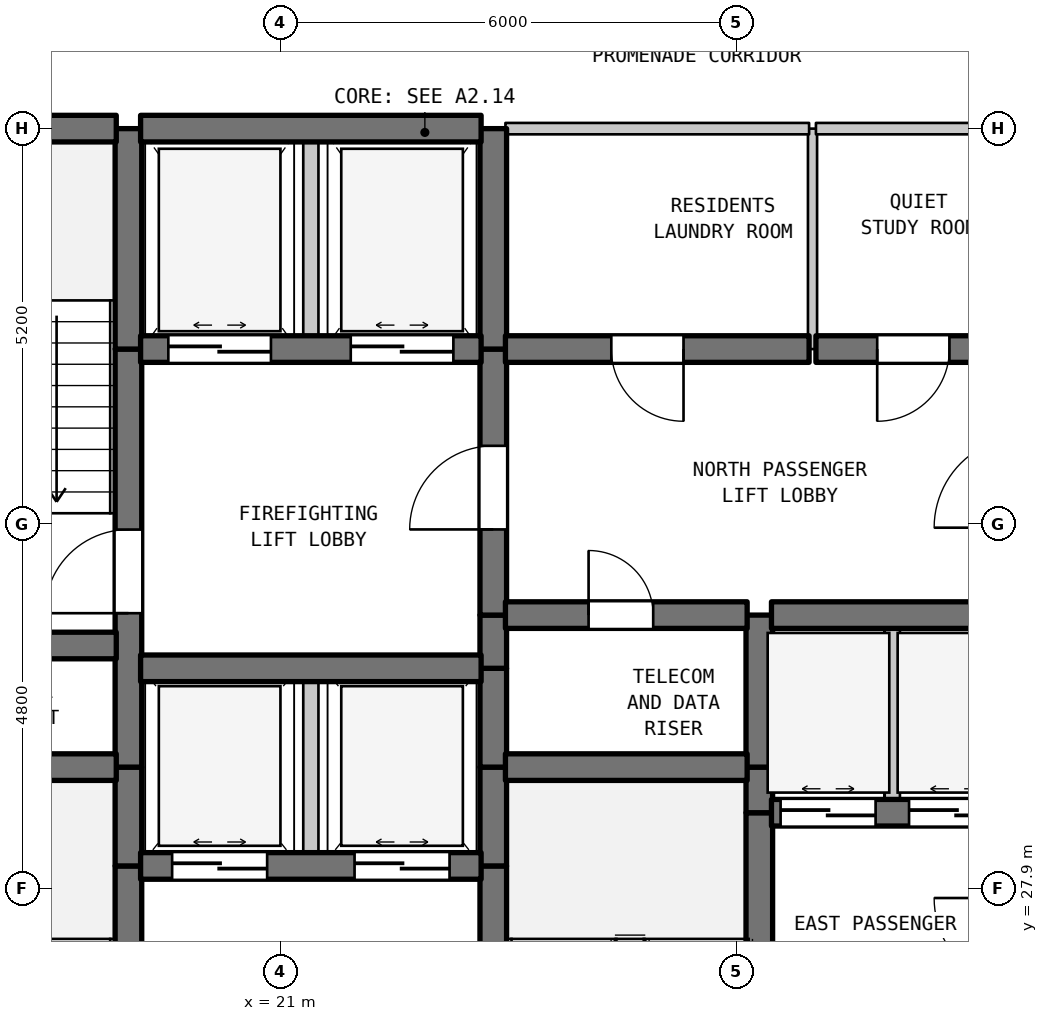
"""IFC4 building model, lengths in metres.
Left out: names, types, materials, properties, quantities, classifications, styles, units other than length and angle.
Written with IfcOpenShell. Run it as: python <this file> out.ifc"""

import sys

from ifc_helpers import new_model, si_unit, direction, frame, frame_2d, origin, place, context, subcontext, project, spatial, rectangle, extrude, element, fill, save


model = new_model("IFC4")
c1 = context("Model", 3, precision=1e-05, world=origin(), true_north=direction((0.0, 1.0)))
c2 = subcontext(c1, "Body", "Model", "MODEL_VIEW")
j1 = project(units=[si_unit("LENGTHUNIT", "METRE"), si_unit("PLANEANGLEUNIT", "RADIAN")], contexts=[c1])
p1 = place(None, origin())
s1 = spatial("IfcSite", under=j1, at=p1, CompositionType="ELEMENT")
p2 = place(p1, origin())
s2 = spatial("IfcBuilding", under=s1, at=p2, CompositionType="ELEMENT")
p3 = place(p2, frame((0.0, 0.0, 172.8)))
s3 = spatial("IfcBuildingStorey", under=s2, at=p3, CompositionType="ELEMENT", Elevation=172.8)
p4 = place(p3, frame((19.0, 22.7, 0.0), z_axis=(0.0, 0.0, 1.0), x_axis=(0.0, 1.0, 0.0)))
e1 = element("IfcWall", 1, at=p4, inside=s3, PredefinedType="SHEAR", context=c2, shape_type="SweptSolid", body=[
    extrude(rectangle(XDim=5.5, YDim=0.35, at=frame_2d((2.75, 0.0))), origin(), (0.0, 0.0, 1.0), 3.39),
])
p5 = place(p4, frame((0.631, 0.0, 0.0)))
e2 = element("IfcOpeningElement", 2, at=p5, cuts=e1, PredefinedType="OPENING", context=c2, shape_type="SweptSolid", body=[
    extrude(rectangle(XDim=1.1, YDim=2.15, at=frame_2d((0.55, 1.075))), frame((0.0, 0.185, 0.0), z_axis=(0.0, -1.0, 0.0), x_axis=(1.0, 0.0, 0.0)), (0.0, 0.0, 1.0), 0.37),
])
p6 = place(p3, frame((19.0, 28.2, 0.0), z_axis=(0.0, 0.0, 1.0), x_axis=(0.0, 1.0, 0.0)))
e3 = element("IfcWall", 3, at=p6, inside=s3, PredefinedType="SHEAR", context=c2, shape_type="SweptSolid", body=[
    extrude(rectangle(XDim=1.3, YDim=0.35, at=frame_2d((0.65, 0.0))), origin(), (0.0, 0.0, 1.0), 3.39),
])
p7 = place(p3, frame((19.0, 29.5, 0.0), z_axis=(0.0, 0.0, 1.0), x_axis=(0.0, 1.0, 0.0)))
e4 = element("IfcWall", 4, at=p7, inside=s3, PredefinedType="SHEAR", context=c2, shape_type="SweptSolid", body=[
    extrude(rectangle(XDim=5.5, YDim=0.35, at=frame_2d((2.75, 0.0))), origin(), (0.0, 0.0, 1.0), 3.39),
])
p8 = place(p7, frame((2.025, 0.0, 0.0)))
e5 = element("IfcOpeningElement", 5, at=p8, cuts=e4, PredefinedType="OPENING", context=c2, shape_type="SweptSolid", body=[
    extrude(rectangle(XDim=1.1, YDim=2.15, at=frame_2d((0.55, 1.075))), frame((0.0, 0.185, 0.0), z_axis=(0.0, -1.0, 0.0), x_axis=(1.0, 0.0, 0.0)), (0.0, 0.0, 1.0), 0.37),
])
p9 = place(p3, frame((19.0, 35.0, 0.0), z_axis=(0.0, 0.0, 1.0), x_axis=(0.0, 1.0, 0.0)))
e6 = element("IfcWall", 6, at=p9, inside=s3, PredefinedType="SHEAR", context=c2, shape_type="SweptSolid", body=[
    extrude(rectangle(XDim=2.9, YDim=0.35, at=frame_2d((1.45, 0.0))), origin(), (0.0, 0.0, 1.0), 3.39),
])
p10 = place(p3, frame((21.4, 28.2, 0.0), z_axis=(0.0, 0.0, 1.0), x_axis=(0.0, 1.0, 0.0)))
e7 = element("IfcWall", 7, at=p10, inside=s3, PredefinedType="STANDARD", context=c2, shape_type="SweptSolid", body=[
    extrude(rectangle(XDim=2.6, YDim=0.2, at=frame_2d((1.3, 0.0))), origin(), (0.0, 0.0, 1.0), 3.39),
])
p11 = place(p3, frame((21.4, 35.0, 0.0), z_axis=(0.0, 0.0, 1.0), x_axis=(0.0, 1.0, 0.0)))
e8 = element("IfcWall", 8, at=p11, inside=s3, PredefinedType="STANDARD", context=c2, shape_type="SweptSolid", body=[
    extrude(rectangle(XDim=2.9, YDim=0.2, at=frame_2d((1.45, 0.0))), origin(), (0.0, 0.0, 1.0), 3.39),
])
p12 = place(p3, frame((23.8, 22.7, 0.0), z_axis=(0.0, 0.0, 1.0), x_axis=(0.0, 1.0, 0.0)))
e9 = element("IfcWall", 9, at=p12, inside=s3, PredefinedType="SHEAR", context=c2, shape_type="SweptSolid", body=[
    extrude(rectangle(XDim=5.5, YDim=0.35, at=frame_2d((2.75, 0.0))), origin(), (0.0, 0.0, 1.0), 3.39),
])
p13 = place(p12, frame((0.235, 0.0, 0.0)))
e10 = element("IfcOpeningElement", 10, at=p13, cuts=e9, PredefinedType="OPENING", context=c2, shape_type="SweptSolid", body=[
    extrude(rectangle(XDim=1.1, YDim=2.15, at=frame_2d((0.55, 1.075))), frame((0.0, 0.185, 0.0), z_axis=(0.0, -1.0, 0.0), x_axis=(1.0, 0.0, 0.0)), (0.0, 0.0, 1.0), 0.37),
])
for number, where, z_axis, x_axis in (
    (11, (23.8, 28.2, 0.0), (0.0, 0.0, 1.0), (0.0, 1.0, 0.0)),
    (12, (23.8, 29.5, 0.0), (0.0, 0.0, 1.0), (0.0, 1.0, 0.0)),
):
    element("IfcWall", number, at=place(p3, frame(where, z_axis=z_axis, x_axis=x_axis)), inside=s3, PredefinedType="SHEAR", context=c2, shape_type="SweptSolid", body=[
        extrude(rectangle(XDim=1.3, YDim=0.35, at=frame_2d((0.65, 0.0))), origin(), (0.0, 0.0, 1.0), 3.39),
    ])
p14 = place(p3, frame((23.8, 30.8, 0.0), z_axis=(0.0, 0.0, 1.0), x_axis=(0.0, 1.0, 0.0)))
e13 = element("IfcWall", 13, at=p14, inside=s3, PredefinedType="SHEAR", context=c2, shape_type="SweptSolid", body=[
    extrude(rectangle(XDim=0.7, YDim=0.35, at=frame_2d((0.35, 0.0))), origin(), (0.0, 0.0, 1.0), 3.39),
])
p15 = place(p3, frame((23.8, 31.5, 0.0), z_axis=(0.0, 0.0, 1.0), x_axis=(0.0, 1.0, 0.0)))
e14 = element("IfcWall", 14, at=p15, inside=s3, PredefinedType="SHEAR", context=c2, shape_type="SweptSolid", body=[
    extrude(rectangle(XDim=3.5, YDim=0.35, at=frame_2d((1.75, 0.0))), origin(), (0.0, 0.0, 1.0), 3.39),
])
p16 = place(p15, frame((1.127, 0.0, 0.0)))
e15 = element("IfcOpeningElement", 15, at=p16, cuts=e14, PredefinedType="OPENING", context=c2, shape_type="SweptSolid", body=[
    extrude(rectangle(XDim=1.1, YDim=2.15, at=frame_2d((0.55, 1.075))), frame((0.0, 0.185, 0.0), z_axis=(0.0, -1.0, 0.0), x_axis=(1.0, 0.0, 0.0)), (0.0, 0.0, 1.0), 0.37),
])
p17 = place(p3, frame((23.8, 35.0, 0.0), z_axis=(0.0, 0.0, 1.0), x_axis=(0.0, 1.0, 0.0)))
e16 = element("IfcWall", 16, at=p17, inside=s3, PredefinedType="SHEAR", context=c2, shape_type="SweptSolid", body=[
    extrude(rectangle(XDim=2.9, YDim=0.35, at=frame_2d((1.45, 0.0))), origin(), (0.0, 0.0, 1.0), 3.39),
])
p18 = place(p3, frame((27.3, 25.6, 0.0), z_axis=(0.0, 0.0, 1.0), x_axis=(0.0, 1.0, 0.0)))
e17 = element("IfcWall", 17, at=p18, inside=s3, PredefinedType="SHEAR", context=c2, shape_type="SweptSolid", body=[
    extrude(rectangle(XDim=3.3, YDim=0.35, at=frame_2d((1.65, 0.0))), origin(), (0.0, 0.0, 1.0), 3.39),
])
p19 = place(p3, frame((27.3, 28.9, 0.0), z_axis=(0.0, 0.0, 1.0), x_axis=(0.0, 1.0, 0.0)))
e18 = element("IfcWall", 18, at=p19, inside=s3, PredefinedType="SHEAR", context=c2, shape_type="SweptSolid", body=[
    extrude(rectangle(XDim=0.6, YDim=0.35, at=frame_2d((0.3, 0.0))), origin(), (0.0, 0.0, 1.0), 3.39),
])
p20 = place(p3, frame((27.3, 29.5, 0.0), z_axis=(0.0, 0.0, 1.0), x_axis=(0.0, 1.0, 0.0)))
e19 = element("IfcWall", 19, at=p20, inside=s3, PredefinedType="SHEAR", context=c2, shape_type="SweptSolid", body=[
    extrude(rectangle(XDim=2.0, YDim=0.35, at=frame_2d((1.0, 0.0))), origin(), (0.0, 0.0, 1.0), 3.39),
])
p21 = place(p3, frame((28.0, 35.0, 0.0), z_axis=(0.0, 0.0, 1.0), x_axis=(0.0, 1.0, 0.0)))
e20 = element("IfcWall", 20, at=p21, inside=s3, PredefinedType="PARTITIONING", context=c2, shape_type="SweptSolid", body=[
    extrude(rectangle(XDim=2.9, YDim=0.12, at=frame_2d((1.45, 0.0))), origin(), (0.0, 0.0, 1.0), 3.39),
])
p22 = place(p3, frame((29.05, 28.9, 0.0), z_axis=(0.0, 0.0, 1.0), x_axis=(0.0, 1.0, 0.0)))
e21 = element("IfcWall", 21, at=p22, inside=s3, PredefinedType="STANDARD", context=c2, shape_type="SweptSolid", body=[
    extrude(rectangle(XDim=2.6, YDim=0.2, at=frame_2d((1.3, 0.0))), origin(), (0.0, 0.0, 1.0), 3.39),
])
p23 = place(p3, frame((19.16, 28.2, 0.0), z_axis=(0.0, 0.0, 1.0), x_axis=(1.0, 0.0, 0.0)))
e22 = element("IfcWall", 22, at=p23, inside=s3, PredefinedType="SHEAR", context=c2, shape_type="SweptSolid", body=[
    extrude(rectangle(XDim=4.48, YDim=0.35, at=frame_2d((2.24, 0.0))), origin(), (0.0, 0.0, 1.0), 3.39),
])
p24 = place(p23, frame((0.415, 0.0, 0.0)))
e23 = element("IfcOpeningElement", 23, at=p24, cuts=e22, PredefinedType="OPENING", context=c2, shape_type="SweptSolid", body=[
    extrude(rectangle(XDim=1.25, YDim=2.2, at=frame_2d((0.625, 1.1))), frame((0.0, 0.185, 0.0), z_axis=(0.0, -1.0, 0.0), x_axis=(1.0, 0.0, 0.0)), (0.0, 0.0, 1.0), 0.37),
])
p25 = place(p23, frame((2.815, 0.0, 0.0)))
e24 = element("IfcOpeningElement", 24, at=p25, cuts=e22, PredefinedType="OPENING", context=c2, shape_type="SweptSolid", body=[
    extrude(rectangle(XDim=1.25, YDim=2.2, at=frame_2d((0.625, 1.1))), frame((0.0, 0.185, 0.0), z_axis=(0.0, -1.0, 0.0), x_axis=(1.0, 0.0, 0.0)), (0.0, 0.0, 1.0), 0.37),
])
p26 = place(p3, frame((27.46, 28.9, 0.0), z_axis=(0.0, 0.0, 1.0), x_axis=(1.0, 0.0, 0.0)))
e25 = element("IfcWall", 25, at=p26, inside=s3, PredefinedType="SHEAR", context=c2, shape_type="SweptSolid", body=[
    extrude(rectangle(XDim=3.18, YDim=0.35, at=frame_2d((1.59, 0.0))), origin(), (0.0, 0.0, 1.0), 3.39),
])
p27 = place(p26, frame((0.12, 0.0, 0.0)))
e26 = element("IfcOpeningElement", 26, at=p27, cuts=e25, PredefinedType="OPENING", context=c2, shape_type="SweptSolid", body=[
    extrude(rectangle(XDim=1.25, YDim=2.2, at=frame_2d((0.625, 1.1))), frame((0.0, 0.185, 0.0), z_axis=(0.0, -1.0, 0.0), x_axis=(1.0, 0.0, 0.0)), (0.0, 0.0, 1.0), 0.37),
])
p28 = place(p26, frame((1.81, 0.0, 0.0)))
e27 = element("IfcOpeningElement", 27, at=p28, cuts=e25, PredefinedType="OPENING", context=c2, shape_type="SweptSolid", body=[
    extrude(rectangle(XDim=1.25, YDim=2.2, at=frame_2d((0.625, 1.1))), frame((0.0, 0.185, 0.0), z_axis=(0.0, -1.0, 0.0), x_axis=(1.0, 0.0, 0.0)), (0.0, 0.0, 1.0), 0.37),
])
p29 = place(p3, frame((15.16, 29.5, 0.0), z_axis=(0.0, 0.0, 1.0), x_axis=(1.0, 0.0, 0.0)))
e28 = element("IfcWall", 28, at=p29, inside=s3, PredefinedType="SHEAR", context=c2, shape_type="SweptSolid", body=[
    extrude(rectangle(XDim=3.68, YDim=0.35, at=frame_2d((1.84, 0.0))), origin(), (0.0, 0.0, 1.0), 3.39),
])
p30 = place(p3, frame((23.96, 29.5, 0.0), z_axis=(0.0, 0.0, 1.0), x_axis=(1.0, 0.0, 0.0)))
e29 = element("IfcWall", 29, at=p30, inside=s3, PredefinedType="SHEAR", context=c2, shape_type="SweptSolid", body=[
    extrude(rectangle(XDim=3.18, YDim=0.35, at=frame_2d((1.59, 0.0))), origin(), (0.0, 0.0, 1.0), 3.39),
])
p31 = place(p3, frame((19.16, 30.8, 0.0), z_axis=(0.0, 0.0, 1.0), x_axis=(1.0, 0.0, 0.0)))
e30 = element("IfcWall", 30, at=p31, inside=s3, PredefinedType="SHEAR", context=c2, shape_type="SweptSolid", body=[
    extrude(rectangle(XDim=4.48, YDim=0.35, at=frame_2d((2.24, 0.0))), origin(), (0.0, 0.0, 1.0), 3.39),
])
p32 = place(p3, frame((15.16, 31.1, 0.0), z_axis=(0.0, 0.0, 1.0), x_axis=(1.0, 0.0, 0.0)))
e31 = element("IfcWall", 31, at=p32, inside=s3, PredefinedType="SHEAR", context=c2, shape_type="SweptSolid", body=[
    extrude(rectangle(XDim=3.68, YDim=0.35, at=frame_2d((1.84, 0.0))), origin(), (0.0, 0.0, 1.0), 3.39),
])
p33 = place(p3, frame((23.96, 31.5, 0.0), z_axis=(0.0, 0.0, 1.0), x_axis=(1.0, 0.0, 0.0)))
e32 = element("IfcWall", 32, at=p33, inside=s3, PredefinedType="SHEAR", context=c2, shape_type="SweptSolid", body=[
    extrude(rectangle(XDim=3.18, YDim=0.35, at=frame_2d((1.59, 0.0))), origin(), (0.0, 0.0, 1.0), 3.39),
])
p34 = place(p33, frame((1.094, 0.0, 0.0)))
e33 = element("IfcOpeningElement", 33, at=p34, cuts=e32, PredefinedType="OPENING", context=c2, shape_type="SweptSolid", body=[
    extrude(rectangle(XDim=0.85, YDim=2.1, at=frame_2d((0.425, 1.05))), frame((0.0, 0.185, 0.0), z_axis=(0.0, -1.0, 0.0), x_axis=(1.0, 0.0, 0.0)), (0.0, 0.0, 1.0), 0.37),
])
p35 = place(p3, frame((27.46, 31.5, 0.0), z_axis=(0.0, 0.0, 1.0), x_axis=(1.0, 0.0, 0.0)))
e34 = element("IfcWall", 34, at=p35, inside=s3, PredefinedType="SHEAR", context=c2, shape_type="SweptSolid", body=[
    extrude(rectangle(XDim=3.18, YDim=0.35, at=frame_2d((1.59, 0.0))), origin(), (0.0, 0.0, 1.0), 3.39),
])
p36 = place(p3, frame((19.16, 35.0, 0.0), z_axis=(0.0, 0.0, 1.0), x_axis=(1.0, 0.0, 0.0)))
e35 = element("IfcWall", 35, at=p36, inside=s3, PredefinedType="SHEAR", context=c2, shape_type="SweptSolid", body=[
    extrude(rectangle(XDim=4.48, YDim=0.35, at=frame_2d((2.24, 0.0))), origin(), (0.0, 0.0, 1.0), 3.39),
])
p37 = place(p36, frame((0.365, 0.0, 0.0)))
e36 = element("IfcOpeningElement", 36, at=p37, cuts=e35, PredefinedType="OPENING", context=c2, shape_type="SweptSolid", body=[
    extrude(rectangle(XDim=1.35, YDim=2.2, at=frame_2d((0.675, 1.1))), frame((0.0, 0.185, 0.0), z_axis=(0.0, -1.0, 0.0), x_axis=(1.0, 0.0, 0.0)), (0.0, 0.0, 1.0), 0.37),
])
p38 = place(p36, frame((2.765, 0.0, 0.0)))
e37 = element("IfcOpeningElement", 37, at=p38, cuts=e35, PredefinedType="OPENING", context=c2, shape_type="SweptSolid", body=[
    extrude(rectangle(XDim=1.35, YDim=2.2, at=frame_2d((0.675, 1.1))), frame((0.0, 0.185, 0.0), z_axis=(0.0, -1.0, 0.0), x_axis=(1.0, 0.0, 0.0)), (0.0, 0.0, 1.0), 0.37),
])
p39 = place(p3, frame((23.96, 35.0, 0.0), z_axis=(0.0, 0.0, 1.0), x_axis=(1.0, 0.0, 0.0)))
e38 = element("IfcWall", 38, at=p39, inside=s3, PredefinedType="SHEAR", context=c2, shape_type="SweptSolid", body=[
    extrude(rectangle(XDim=3.995, YDim=0.35, at=frame_2d((1.998, 0.0))), origin(), (0.0, 0.0, 1.0), 3.39),
])
p40 = place(p39, frame((1.393, 0.0, 0.0)))
e39 = element("IfcOpeningElement", 39, at=p40, cuts=e38, PredefinedType="OPENING", context=c2, shape_type="SweptSolid", body=[
    extrude(rectangle(XDim=0.95, YDim=2.15, at=frame_2d((0.475, 1.075))), frame((0.0, 0.185, 0.0), z_axis=(0.0, -1.0, 0.0), x_axis=(1.0, 0.0, 0.0)), (0.0, 0.0, 1.0), 0.37),
])
p41 = place(p3, frame((28.045, 35.0, 0.0), z_axis=(0.0, 0.0, 1.0), x_axis=(1.0, 0.0, 0.0)))
e40 = element("IfcWall", 40, at=p41, inside=s3, PredefinedType="SHEAR", context=c2, shape_type="SweptSolid", body=[
    extrude(rectangle(XDim=2.595, YDim=0.35, at=frame_2d((1.297, 0.0))), origin(), (0.0, 0.0, 1.0), 3.39),
])
p42 = place(p41, frame((0.806, 0.0, 0.0)))
e41 = element("IfcOpeningElement", 41, at=p42, cuts=e40, PredefinedType="OPENING", context=c2, shape_type="SweptSolid", body=[
    extrude(rectangle(XDim=0.95, YDim=2.15, at=frame_2d((0.475, 1.075))), frame((0.0, 0.185, 0.0), z_axis=(0.0, -1.0, 0.0), x_axis=(1.0, 0.0, 0.0)), (0.0, 0.0, 1.0), 0.37),
])
p43 = place(p3, frame((15.16, 37.9, 0.0), z_axis=(0.0, 0.0, 1.0), x_axis=(1.0, 0.0, 0.0)))
e42 = element("IfcWall", 42, at=p43, inside=s3, PredefinedType="SHEAR", context=c2, shape_type="SweptSolid", body=[
    extrude(rectangle(XDim=3.68, YDim=0.35, at=frame_2d((1.84, 0.0))), origin(), (0.0, 0.0, 1.0), 3.39),
])
p44 = place(p3, frame((19.16, 37.9, 0.0), z_axis=(0.0, 0.0, 1.0), x_axis=(1.0, 0.0, 0.0)))
e43 = element("IfcWall", 43, at=p44, inside=s3, PredefinedType="SHEAR", context=c2, shape_type="SweptSolid", body=[
    extrude(rectangle(XDim=4.48, YDim=0.35, at=frame_2d((2.24, 0.0))), origin(), (0.0, 0.0, 1.0), 3.39),
])
p45 = place(p3, frame((23.96, 37.9, 0.0), z_axis=(0.0, 0.0, 1.0), x_axis=(1.0, 0.0, 0.0)))
e44 = element("IfcWall", 44, at=p45, inside=s3, PredefinedType="STANDARD", context=c2, shape_type="SweptSolid", body=[
    extrude(rectangle(XDim=3.995, YDim=0.15, at=frame_2d((1.998, 0.0))), origin(), (0.0, 0.0, 1.0), 2.89),
])
p46 = place(p3, frame((28.045, 37.9, 0.0), z_axis=(0.0, 0.0, 1.0), x_axis=(1.0, 0.0, 0.0)))
e45 = element("IfcWall", 45, at=p46, inside=s3, PredefinedType="STANDARD", context=c2, shape_type="SweptSolid", body=[
    extrude(rectangle(XDim=2.695, YDim=0.15, at=frame_2d((1.348, 0.0))), origin(), (0.0, 0.0, 1.0), 2.89),
])
p47 = place(p8, origin())
e46 = element("IfcDoor", 46, at=p47, inside=s3, OperationType="SINGLE_SWING_LEFT", PredefinedType="DOOR", context=c2, shape_type="SweptSolid", body=[
    extrude(rectangle(XDim=1.1, YDim=2.15, at=frame_2d((0.55, 1.075))), frame((0.0, 0.025, 0.0), z_axis=(0.0, -1.0, 0.0), x_axis=(1.0, 0.0, 0.0)), (0.0, 0.0, 1.0), 0.05),
])
fill(e5, e46)
p48 = place(p16, origin())
e47 = element("IfcDoor", 47, at=p48, inside=s3, OperationType="SINGLE_SWING_LEFT", PredefinedType="DOOR", context=c2, shape_type="SweptSolid", body=[
    extrude(rectangle(XDim=1.1, YDim=2.15, at=frame_2d((0.55, 1.075))), frame((0.0, 0.025, 0.0), z_axis=(0.0, -1.0, 0.0), x_axis=(1.0, 0.0, 0.0)), (0.0, 0.0, 1.0), 0.05),
])
fill(e15, e47)
p49 = place(p24, origin())
e48 = element("IfcDoor", 48, at=p49, inside=s3, OperationType="DOUBLE_DOOR_SLIDING", PredefinedType="DOOR", context=c2, shape_type="SweptSolid", body=[
    extrude(rectangle(XDim=1.25, YDim=2.2, at=frame_2d((0.625, 1.1))), frame((0.0, 0.025, 0.0), z_axis=(0.0, -1.0, 0.0), x_axis=(1.0, 0.0, 0.0)), (0.0, 0.0, 1.0), 0.05),
])
fill(e23, e48)
p50 = place(p25, origin())
e49 = element("IfcDoor", 49, at=p50, inside=s3, OperationType="DOUBLE_DOOR_SLIDING", PredefinedType="DOOR", context=c2, shape_type="SweptSolid", body=[
    extrude(rectangle(XDim=1.25, YDim=2.2, at=frame_2d((0.625, 1.1))), frame((0.0, 0.025, 0.0), z_axis=(0.0, -1.0, 0.0), x_axis=(1.0, 0.0, 0.0)), (0.0, 0.0, 1.0), 0.05),
])
fill(e24, e49)
p51 = place(p27, origin())
e50 = element("IfcDoor", 50, at=p51, inside=s3, OperationType="DOUBLE_DOOR_SLIDING", PredefinedType="DOOR", context=c2, shape_type="SweptSolid", body=[
    extrude(rectangle(XDim=1.25, YDim=2.2, at=frame_2d((0.625, 1.1))), frame((0.0, 0.025, 0.0), z_axis=(0.0, -1.0, 0.0), x_axis=(1.0, 0.0, 0.0)), (0.0, 0.0, 1.0), 0.05),
])
fill(e26, e50)
p52 = place(p28, origin())
e51 = element("IfcDoor", 51, at=p52, inside=s3, OperationType="DOUBLE_DOOR_SLIDING", PredefinedType="DOOR", context=c2, shape_type="SweptSolid", body=[
    extrude(rectangle(XDim=1.25, YDim=2.2, at=frame_2d((0.625, 1.1))), frame((0.0, 0.025, 0.0), z_axis=(0.0, -1.0, 0.0), x_axis=(1.0, 0.0, 0.0)), (0.0, 0.0, 1.0), 0.05),
])
fill(e27, e51)
p53 = place(p34, origin())
e52 = element("IfcDoor", 52, at=p53, inside=s3, OperationType="SINGLE_SWING_LEFT", PredefinedType="DOOR", context=c2, shape_type="SweptSolid", body=[
    extrude(rectangle(XDim=0.85, YDim=2.1, at=frame_2d((0.425, 1.05))), frame((0.0, 0.025, 0.0), z_axis=(0.0, -1.0, 0.0), x_axis=(1.0, 0.0, 0.0)), (0.0, 0.0, 1.0), 0.05),
])
fill(e33, e52)
p54 = place(p37, origin())
e53 = element("IfcDoor", 53, at=p54, inside=s3, OperationType="DOUBLE_DOOR_SLIDING", PredefinedType="DOOR", context=c2, shape_type="SweptSolid", body=[
    extrude(rectangle(XDim=1.35, YDim=2.2, at=frame_2d((0.675, 1.1))), frame((0.0, 0.025, 0.0), z_axis=(0.0, -1.0, 0.0), x_axis=(1.0, 0.0, 0.0)), (0.0, 0.0, 1.0), 0.05),
])
fill(e36, e53)
p55 = place(p38, origin())
e54 = element("IfcDoor", 54, at=p55, inside=s3, OperationType="DOUBLE_DOOR_SLIDING", PredefinedType="DOOR", context=c2, shape_type="SweptSolid", body=[
    extrude(rectangle(XDim=1.35, YDim=2.2, at=frame_2d((0.675, 1.1))), frame((0.0, 0.025, 0.0), z_axis=(0.0, -1.0, 0.0), x_axis=(1.0, 0.0, 0.0)), (0.0, 0.0, 1.0), 0.05),
])
fill(e37, e54)
p56 = place(p40, frame((0.95, 0.0, 0.0), z_axis=(0.0, 0.0, 1.0), x_axis=(-1.0, 0.0, 0.0)))
e55 = element("IfcDoor", 55, at=p56, inside=s3, OperationType="SINGLE_SWING_RIGHT", PredefinedType="DOOR", context=c2, shape_type="SweptSolid", body=[
    extrude(rectangle(XDim=0.95, YDim=2.15, at=frame_2d((0.475, 1.075))), frame((0.0, 0.025, 0.0), z_axis=(0.0, -1.0, 0.0), x_axis=(1.0, 0.0, 0.0)), (0.0, 0.0, 1.0), 0.05),
])
fill(e39, e55)
p57 = place(p42, frame((0.95, 0.0, 0.0), z_axis=(0.0, 0.0, 1.0), x_axis=(-1.0, 0.0, 0.0)))
e56 = element("IfcDoor", 56, at=p57, inside=s3, OperationType="SINGLE_SWING_LEFT", PredefinedType="DOOR", context=c2, shape_type="SweptSolid", body=[
    extrude(rectangle(XDim=0.95, YDim=2.15, at=frame_2d((0.475, 1.075))), frame((0.0, 0.025, 0.0), z_axis=(0.0, -1.0, 0.0), x_axis=(1.0, 0.0, 0.0)), (0.0, 0.0, 1.0), 0.05),
])
fill(e41, e56)
save(model, sys.argv[1])
